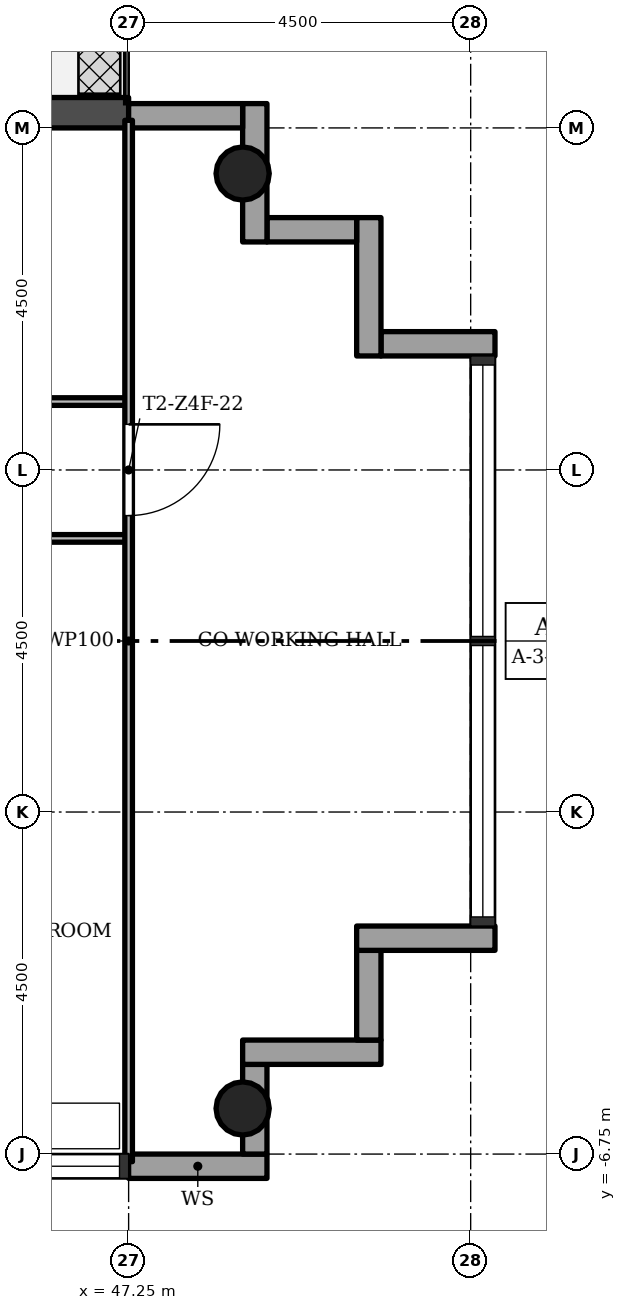
"""IFC4 building model, lengths in metres.
Left out: names, types, materials, properties, quantities, classifications, styles, units other than length and angle.
Written with IfcOpenShell. Run it as: python <this file> out.ifc"""

import sys

from ifc_helpers import new_model, si_unit, direction, frame, frame_2d, origin, origin_2d, place, context, subcontext, project, spatial, rectangle, hollow_circle, extrude, element, fill, save


model = new_model("IFC4")
c1 = context("Model", 3, precision=1e-05, world=origin(), true_north=direction((0.0, 1.0)))
c2 = subcontext(c1, "Body", "Model", "MODEL_VIEW")
j1 = project(units=[si_unit("LENGTHUNIT", "METRE"), si_unit("PLANEANGLEUNIT", "RADIAN")], contexts=[c1])
p1 = place(None, origin())
s1 = spatial("IfcSite", under=j1, at=p1, CompositionType="ELEMENT")
p2 = place(p1, origin())
s2 = spatial("IfcBuilding", under=s1, at=p2, CompositionType="ELEMENT")
p3 = place(p2, frame((0.0, 0.0, 219.8)))
s3 = spatial("IfcBuildingStorey", under=s2, at=p3, CompositionType="ELEMENT", Elevation=219.8)
for number, where, z_axis, x_axis in (
    (1, (48.75, -6.15, 0.0), (0.0, 0.0, 1.0), (1.0, 0.0, 0.0)),
    (2, (48.75, 6.15, 0.0), (0.0, 0.0, 1.0), (1.0, 0.0, 0.0)),
):
    element("IfcColumn", number, at=place(p3, frame(where, z_axis=z_axis, x_axis=x_axis)), inside=s3, PredefinedType="COLUMN", context=c2, shape_type="SweptSolid", body=[
        extrude(hollow_circle(Radius=0.35, WallThickness=0.025, at=origin_2d()), origin(), (0.0, 0.0, 1.0), 3.4),
    ])
p4 = place(p3, frame((47.25, -6.91, -0.3), z_axis=(0.0, 0.0, 1.0), x_axis=(1.0, 0.0, 0.0)))
e3 = element("IfcWall", 3, at=p4, inside=s3, PredefinedType="STANDARD", context=c2, shape_type="SweptSolid", body=[
    extrude(rectangle(XDim=1.82, YDim=0.32, at=frame_2d((0.91, 0.0))), origin(), (0.0, 0.0, 1.0), 3.4),
])
p5 = place(p3, frame((48.91, -6.75, -0.3), z_axis=(0.0, 0.0, 1.0), x_axis=(0.0, 1.0, 0.0)))
e4 = element("IfcWall", 4, at=p5, inside=s3, PredefinedType="STANDARD", context=c2, shape_type="SweptSolid", body=[
    extrude(rectangle(XDim=1.18, YDim=0.32, at=frame_2d((0.59, 0.0))), origin(), (0.0, 0.0, 1.0), 3.4),
])
p6 = place(p3, frame((48.75, -5.41, -0.3), z_axis=(0.0, 0.0, 1.0), x_axis=(1.0, 0.0, 0.0)))
e5 = element("IfcWall", 5, at=p6, inside=s3, PredefinedType="STANDARD", context=c2, shape_type="SweptSolid", body=[
    extrude(rectangle(XDim=1.82, YDim=0.32, at=frame_2d((0.91, 0.0))), origin(), (0.0, 0.0, 1.0), 3.4),
])
p7 = place(p3, frame((50.41, -5.25, -0.3), z_axis=(0.0, 0.0, 1.0), x_axis=(0.0, 1.0, 0.0)))
e6 = element("IfcWall", 6, at=p7, inside=s3, PredefinedType="STANDARD", context=c2, shape_type="SweptSolid", body=[
    extrude(rectangle(XDim=1.18, YDim=0.32, at=frame_2d((0.59, 0.0))), origin(), (0.0, 0.0, 1.0), 3.4),
])
p8 = place(p3, frame((50.25, -3.91, -0.3), z_axis=(0.0, 0.0, 1.0), x_axis=(1.0, 0.0, 0.0)))
e7 = element("IfcWall", 7, at=p8, inside=s3, PredefinedType="STANDARD", context=c2, shape_type="SweptSolid", body=[
    extrude(rectangle(XDim=1.82, YDim=0.32, at=frame_2d((0.91, 0.0))), origin(), (0.0, 0.0, 1.0), 3.4),
])
p9 = place(p3, frame((52.07, 3.91, -0.3), z_axis=(0.0, 0.0, 1.0), x_axis=(-1.0, 0.0, 0.0)))
e8 = element("IfcWall", 8, at=p9, inside=s3, PredefinedType="STANDARD", context=c2, shape_type="SweptSolid", body=[
    extrude(rectangle(XDim=1.5, YDim=0.32, at=frame_2d((0.75, 0.0))), origin(), (0.0, 0.0, 1.0), 3.4),
])
p10 = place(p3, frame((50.41, 3.75, -0.3), z_axis=(0.0, 0.0, 1.0), x_axis=(0.0, 1.0, 0.0)))
e9 = element("IfcWall", 9, at=p10, inside=s3, PredefinedType="STANDARD", context=c2, shape_type="SweptSolid", body=[
    extrude(rectangle(XDim=1.82, YDim=0.32, at=frame_2d((0.91, 0.0))), origin(), (0.0, 0.0, 1.0), 3.4),
])
p11 = place(p3, frame((50.25, 5.41, -0.3), z_axis=(0.0, 0.0, 1.0), x_axis=(-1.0, 0.0, 0.0)))
e10 = element("IfcWall", 10, at=p11, inside=s3, PredefinedType="STANDARD", context=c2, shape_type="SweptSolid", body=[
    extrude(rectangle(XDim=1.18, YDim=0.32, at=frame_2d((0.59, 0.0))), origin(), (0.0, 0.0, 1.0), 3.4),
])
p12 = place(p3, frame((48.91, 5.25, -0.3), z_axis=(0.0, 0.0, 1.0), x_axis=(0.0, 1.0, 0.0)))
e11 = element("IfcWall", 11, at=p12, inside=s3, PredefinedType="STANDARD", context=c2, shape_type="SweptSolid", body=[
    extrude(rectangle(XDim=1.82, YDim=0.32, at=frame_2d((0.91, 0.0))), origin(), (0.0, 0.0, 1.0), 3.4),
])
p13 = place(p3, frame((48.75, 6.91, -0.3), z_axis=(0.0, 0.0, 1.0), x_axis=(-1.0, 0.0, 0.0)))
e12 = element("IfcWall", 12, at=p13, inside=s3, PredefinedType="STANDARD", context=c2, shape_type="SweptSolid", body=[
    extrude(rectangle(XDim=1.5, YDim=0.32, at=frame_2d((0.75, 0.0))), origin(), (0.0, 0.0, 1.0), 3.4),
])
p14 = place(p3, frame((47.25, 6.95, -0.02), z_axis=(0.0, 0.0, 1.0), x_axis=(-1.0, 0.0, 0.0)))
e13 = element("IfcWall", 13, at=p14, inside=s3, PredefinedType="STANDARD", context=c2, shape_type="SweptSolid", body=[
    extrude(rectangle(XDim=4.5, YDim=0.4, at=frame_2d((2.25, 0.0))), origin(), (0.0, 0.0, 1.0), 3.12),
])
p15 = place(p14, frame((1.35, 0.0, 0.02)))
e14 = element("IfcOpeningElement", 14, at=p15, cuts=e13, PredefinedType="OPENING", context=c2, shape_type="SweptSolid", body=[
    extrude(rectangle(XDim=1.8, YDim=2.1, at=frame_2d((0.9, 1.05))), frame((0.0, 0.21, 0.0), z_axis=(0.0, -1.0, 0.0), x_axis=(1.0, 0.0, 0.0)), (0.0, 0.0, 1.0), 0.42),
])
p16 = place(p3, frame((47.25, 1.35, 0.0), z_axis=(0.0, 0.0, 1.0), x_axis=(-1.0, 0.0, 0.0)))
e15 = element("IfcWall", 15, at=p16, inside=s3, PredefinedType="PARTITIONING", context=c2, shape_type="SweptSolid", body=[
    extrude(rectangle(XDim=2.7, YDim=0.1, at=frame_2d((1.35, 0.0))), origin(), (0.0, 0.0, 1.0), 3.0),
])
p17 = place(p16, frame((1.73, 0.0, 0.0)))
e16 = element("IfcOpeningElement", 16, at=p17, cuts=e15, PredefinedType="OPENING", context=c2, shape_type="SweptSolid", body=[
    extrude(rectangle(XDim=0.9, YDim=2.1, at=frame_2d((0.45, 1.05))), frame((0.0, 0.06, 0.0), z_axis=(0.0, -1.0, 0.0), x_axis=(1.0, 0.0, 0.0)), (0.0, 0.0, 1.0), 0.12),
])
p18 = place(p3, frame((47.25, 3.15, 0.0), z_axis=(0.0, 0.0, 1.0), x_axis=(-1.0, 0.0, 0.0)))
e17 = element("IfcWall", 17, at=p18, inside=s3, PredefinedType="PARTITIONING", context=c2, shape_type="SweptSolid", body=[
    extrude(rectangle(XDim=4.5, YDim=0.1, at=frame_2d((2.25, 0.0))), origin(), (0.0, 0.0, 1.0), 3.0),
])
p19 = place(p18, frame((1.8, 0.0, 0.0)))
e18 = element("IfcOpeningElement", 18, at=p19, cuts=e17, PredefinedType="OPENING", context=c2, shape_type="SweptSolid", body=[
    extrude(rectangle(XDim=0.9, YDim=2.1, at=frame_2d((0.45, 1.05))), frame((0.0, 0.06, 0.0), z_axis=(0.0, -1.0, 0.0), x_axis=(1.0, 0.0, 0.0)), (0.0, 0.0, 1.0), 0.12),
])
p20 = place(p3, frame((47.25, -6.85, 0.0), z_axis=(0.0, 0.0, 1.0), x_axis=(0.0, 1.0, 0.0)))
e19 = element("IfcWall", 19, at=p20, inside=s3, PredefinedType="PARTITIONING", context=c2, shape_type="SweptSolid", body=[
    extrude(rectangle(XDim=13.7, YDim=0.1, at=frame_2d((6.85, 0.0))), origin(), (0.0, 0.0, 1.0), 3.0),
])
p21 = place(p20, frame((8.5, 0.0, 0.0)))
e20 = element("IfcOpeningElement", 20, at=p21, cuts=e19, PredefinedType="OPENING", context=c2, shape_type="SweptSolid", body=[
    extrude(rectangle(XDim=1.2, YDim=2.1, at=frame_2d((0.6, 1.05))), frame((0.0, 0.06, 0.0), z_axis=(0.0, -1.0, 0.0), x_axis=(1.0, 0.0, 0.0)), (0.0, 0.0, 1.0), 0.12),
])
p22 = place(p21, origin())
e21 = element("IfcDoor", 21, at=p22, inside=s3, OperationType="SINGLE_SWING_RIGHT", PredefinedType="DOOR", context=c2, shape_type="SweptSolid", body=[
    extrude(rectangle(XDim=1.2, YDim=2.1, at=frame_2d((0.6, 1.05))), frame((0.0, 0.025, 0.0), z_axis=(0.0, -1.0, 0.0), x_axis=(1.0, 0.0, 0.0)), (0.0, 0.0, 1.0), 0.05),
])
fill(e20, e21)
save(model, sys.argv[1])
